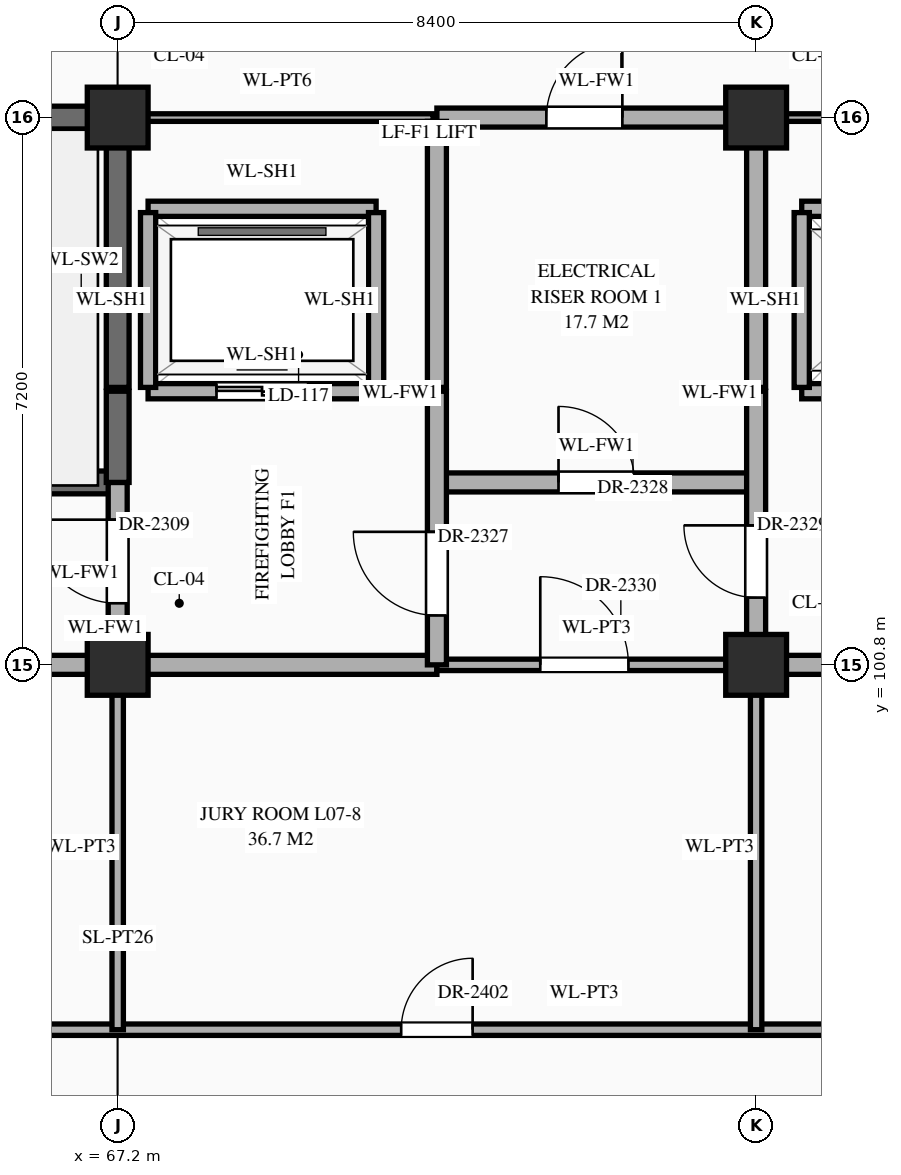
"""IFC4 building model, lengths in metres.
Left out: names, types, materials, properties, quantities, classifications, styles, units other than length and angle.
Written with IfcOpenShell. Run it as: python <this file> out.ifc"""

import sys

from ifc_helpers import new_model, si_unit, direction, frame, frame_2d, origin, origin_2d, place, context, subcontext, project, spatial, rectangle, extrude, element, fill, save


model = new_model("IFC4")
c1 = context("Model", 3, precision=1e-05, world=origin(), true_north=direction((0.0, 1.0)))
c2 = subcontext(c1, "Body", "Model", "MODEL_VIEW")
j1 = project(units=[si_unit("LENGTHUNIT", "METRE"), si_unit("PLANEANGLEUNIT", "RADIAN")], contexts=[c1])
p1 = place(None, origin())
s1 = spatial("IfcSite", under=j1, at=p1, CompositionType="ELEMENT")
p2 = place(p1, origin())
s2 = spatial("IfcBuilding", under=s1, at=p2, CompositionType="ELEMENT")
p3 = place(p2, frame((0.0, 0.0, 30.6)))
s3 = spatial("IfcBuildingStorey", under=s2, at=p3, CompositionType="ELEMENT", Elevation=30.6)
for number, where, z_axis, x_axis in (
    (1, (67.2, 100.8, 0.0), (0.0, 0.0, 1.0), (1.0, 0.0, 0.0)),
    (2, (67.2, 108.0, 0.0), (0.0, 0.0, 1.0), (1.0, 0.0, 0.0)),
    (3, (75.6, 100.8, 0.0), (0.0, 0.0, 1.0), (1.0, 0.0, 0.0)),
    (4, (75.6, 108.0, 0.0), (0.0, 0.0, 1.0), (1.0, 0.0, 0.0)),
):
    element("IfcColumn", number, at=place(p3, frame(where, z_axis=z_axis, x_axis=x_axis)), inside=s3, PredefinedType="COLUMN", context=c2, shape_type="SweptSolid", body=[
        extrude(rectangle(XDim=0.8, YDim=0.8, at=origin_2d()), origin(), (0.0, 0.0, 1.0), 4.5),
    ])
p4 = place(p3, frame((56.2, 96.0, 0.0), z_axis=(0.0, 0.0, 1.0), x_axis=(1.0, 0.0, 0.0)))
e5 = element("IfcWall", 5, at=p4, inside=s3, PredefinedType="STANDARD", context=c2, shape_type="SweptSolid", body=[
    extrude(rectangle(XDim=27.8, YDim=0.15, at=frame_2d((13.9, 0.0))), origin(), (0.0, 0.0, 1.0), 4.24),
])
p5 = place(p4, frame((0.68, 0.0, 0.0)))
e6 = element("IfcOpeningElement", 6, at=p5, cuts=e5, PredefinedType="OPENING", context=c2, shape_type="SweptSolid", body=[
    extrude(rectangle(XDim=1.24, YDim=2.3, at=frame_2d((0.62, 1.15))), frame((0.0, 0.087, 0.0), z_axis=(0.0, -1.0, 0.0), x_axis=(1.0, 0.0, 0.0)), (0.0, 0.0, 1.0), 0.174),
])
p6 = place(p4, frame((6.16, 0.0, 0.0)))
e7 = element("IfcOpeningElement", 7, at=p6, cuts=e5, PredefinedType="OPENING", context=c2, shape_type="SweptSolid", body=[
    extrude(rectangle(XDim=1.28, YDim=2.35, at=frame_2d((0.64, 1.175))), frame((0.0, 0.087, 0.0), z_axis=(0.0, -1.0, 0.0), x_axis=(1.0, 0.0, 0.0)), (0.0, 0.0, 1.0), 0.174),
])
p7 = place(p4, frame((14.73, 0.0, 0.0)))
e8 = element("IfcOpeningElement", 8, at=p7, cuts=e5, PredefinedType="OPENING", context=c2, shape_type="SweptSolid", body=[
    extrude(rectangle(XDim=0.94, YDim=2.3, at=frame_2d((0.47, 1.15))), frame((0.0, 0.087, 0.0), z_axis=(0.0, -1.0, 0.0), x_axis=(1.0, 0.0, 0.0)), (0.0, 0.0, 1.0), 0.174),
])
p8 = place(p4, frame((23.11, 0.0, 0.0)))
e9 = element("IfcOpeningElement", 9, at=p8, cuts=e5, PredefinedType="OPENING", context=c2, shape_type="SweptSolid", body=[
    extrude(rectangle(XDim=0.98, YDim=2.35, at=frame_2d((0.49, 1.175))), frame((0.0, 0.087, 0.0), z_axis=(0.0, -1.0, 0.0), x_axis=(1.0, 0.0, 0.0)), (0.0, 0.0, 1.0), 0.174),
])
p9 = place(p3, frame((58.8, 100.8, 0.0), z_axis=(0.0, 0.0, 1.0), x_axis=(1.0, 0.0, 0.0)))
e10 = element("IfcWall", 10, at=p9, inside=s3, PredefinedType="STANDARD", context=c2, shape_type="SweptSolid", body=[
    extrude(rectangle(XDim=12.6, YDim=0.25, at=frame_2d((6.3, 0.0))), origin(), (0.0, 0.0, 1.0), 3.39),
])
p10 = place(p9, frame((3.725, 0.0, 0.0)))
e11 = element("IfcOpeningElement", 11, at=p10, cuts=e10, PredefinedType="OPENING", context=c2, shape_type="SweptSolid", body=[
    extrude(rectangle(XDim=0.95, YDim=2.15, at=frame_2d((0.475, 1.075))), frame((0.0, 0.137, 0.0), z_axis=(0.0, -1.0, 0.0), x_axis=(1.0, 0.0, 0.0)), (0.0, 0.0, 1.0), 0.274),
])
p11 = place(p3, frame((71.4, 100.8, 0.0), z_axis=(0.0, 0.0, 1.0), x_axis=(1.0, 0.0, 0.0)))
e12 = element("IfcWall", 12, at=p11, inside=s3, PredefinedType="STANDARD", context=c2, shape_type="SweptSolid", body=[
    extrude(rectangle(XDim=4.2, YDim=0.15, at=frame_2d((2.1, 0.0))), origin(), (0.0, 0.0, 1.0), 3.39),
])
p12 = place(p11, frame((1.36, 0.0, 0.0)))
e13 = element("IfcOpeningElement", 13, at=p12, cuts=e12, PredefinedType="OPENING", context=c2, shape_type="SweptSolid", body=[
    extrude(rectangle(XDim=1.16, YDim=2.3, at=frame_2d((0.58, 1.15))), frame((0.0, 0.087, 0.0), z_axis=(0.0, -1.0, 0.0), x_axis=(1.0, 0.0, 0.0)), (0.0, 0.0, 1.0), 0.174),
])
p13 = place(p3, frame((75.6, 100.8, 0.0), z_axis=(0.0, 0.0, 1.0), x_axis=(1.0, 0.0, 0.0)))
e14 = element("IfcWall", 14, at=p13, inside=s3, PredefinedType="STANDARD", context=c2, shape_type="SweptSolid", body=[
    extrude(rectangle(XDim=16.8, YDim=0.25, at=frame_2d((8.4, 0.0))), origin(), (0.0, 0.0, 1.0), 3.39),
])
p14 = place(p13, frame((3.65, 0.0, 0.0)))
e15 = element("IfcOpeningElement", 15, at=p14, cuts=e14, PredefinedType="OPENING", context=c2, shape_type="SweptSolid", body=[
    extrude(rectangle(XDim=1.1, YDim=2.2, at=frame_2d((0.55, 1.1))), frame((0.0, 0.137, 0.0), z_axis=(0.0, -1.0, 0.0), x_axis=(1.0, 0.0, 0.0)), (0.0, 0.0, 1.0), 0.274),
])
p15 = place(p13, frame((9.785, 0.0, 0.0)))
e16 = element("IfcOpeningElement", 16, at=p15, cuts=e14, PredefinedType="OPENING", context=c2, shape_type="SweptSolid", body=[
    extrude(rectangle(XDim=0.95, YDim=2.15, at=frame_2d((0.475, 1.075))), frame((0.0, 0.137, 0.0), z_axis=(0.0, -1.0, 0.0), x_axis=(1.0, 0.0, 0.0)), (0.0, 0.0, 1.0), 0.274),
])
p16 = place(p13, frame((12.45, 0.0, 0.0)))
e17 = element("IfcOpeningElement", 17, at=p16, cuts=e14, PredefinedType="OPENING", context=c2, shape_type="SweptSolid", body=[
    extrude(rectangle(XDim=1.1, YDim=2.2, at=frame_2d((0.55, 1.1))), frame((0.0, 0.137, 0.0), z_axis=(0.0, -1.0, 0.0), x_axis=(1.0, 0.0, 0.0)), (0.0, 0.0, 1.0), 0.274),
])
p17 = place(p13, frame((14.84, 0.0, 0.0)))
e18 = element("IfcOpeningElement", 18, at=p17, cuts=e14, PredefinedType="OPENING", context=c2, shape_type="SweptSolid", body=[
    extrude(rectangle(XDim=1.0, YDim=2.2, at=frame_2d((0.5, 1.1))), frame((0.0, 0.137, 0.0), z_axis=(0.0, -1.0, 0.0), x_axis=(1.0, 0.0, 0.0)), (0.0, 0.0, 1.0), 0.274),
])
p18 = place(p3, frame((58.8, 103.2, 0.0), z_axis=(0.0, 0.0, 1.0), x_axis=(1.0, 0.0, 0.0)))
e19 = element("IfcWall", 19, at=p18, inside=s3, PredefinedType="SHEAR", context=c2, shape_type="SweptSolid", body=[
    extrude(rectangle(XDim=8.4, YDim=0.3, at=frame_2d((4.2, 0.0))), origin(), (0.0, 0.0, 1.0), 4.24),
])
p19 = place(p18, frame((0.65, 0.0, 0.0)))
e20 = element("IfcOpeningElement", 20, at=p19, cuts=e19, PredefinedType="OPENING", context=c2, shape_type="SweptSolid", body=[
    extrude(rectangle(XDim=1.1, YDim=2.2, at=frame_2d((0.55, 1.1))), frame((0.0, 0.162, 0.0), z_axis=(0.0, -1.0, 0.0), x_axis=(1.0, 0.0, 0.0)), (0.0, 0.0, 1.0), 0.324),
])
p20 = place(p3, frame((71.4, 103.2, 0.0), z_axis=(0.0, 0.0, 1.0), x_axis=(1.0, 0.0, 0.0)))
e21 = element("IfcWall", 21, at=p20, inside=s3, PredefinedType="STANDARD", context=c2, shape_type="SweptSolid", body=[
    extrude(rectangle(XDim=4.2, YDim=0.25, at=frame_2d((2.1, 0.0))), origin(), (0.0, 0.0, 1.0), 4.24),
])
p21 = place(p20, frame((1.6, 0.0, 0.0)))
e22 = element("IfcOpeningElement", 22, at=p21, cuts=e21, PredefinedType="OPENING", context=c2, shape_type="SweptSolid", body=[
    extrude(rectangle(XDim=1.0, YDim=2.2, at=frame_2d((0.5, 1.1))), frame((0.0, 0.137, 0.0), z_axis=(0.0, -1.0, 0.0), x_axis=(1.0, 0.0, 0.0)), (0.0, 0.0, 1.0), 0.274),
])
p22 = place(p3, frame((67.6, 104.4, 0.0), z_axis=(0.0, 0.0, 1.0), x_axis=(1.0, 0.0, 0.0)))
e23 = element("IfcWall", 23, at=p22, inside=s3, PredefinedType="STANDARD", context=c2, shape_type="SweptSolid", body=[
    extrude(rectangle(XDim=3.0, YDim=0.2, at=frame_2d((1.5, 0.0))), origin(), (0.0, 0.0, 1.0), 4.24),
])
p23 = place(p22, frame((0.9, 0.0, 0.0)))
e24 = element("IfcOpeningElement", 24, at=p23, cuts=e23, PredefinedType="OPENING", context=c2, shape_type="SweptSolid", body=[
    extrude(rectangle(XDim=1.2, YDim=2.15, at=frame_2d((0.6, 1.075))), frame((0.0, 0.112, 0.0), z_axis=(0.0, -1.0, 0.0), x_axis=(1.0, 0.0, 0.0)), (0.0, 0.0, 1.0), 0.224),
])
p24 = place(p3, frame((76.2, 104.4, 0.0), z_axis=(0.0, 0.0, 1.0), x_axis=(1.0, 0.0, 0.0)))
e25 = element("IfcWall", 25, at=p24, inside=s3, PredefinedType="STANDARD", context=c2, shape_type="SweptSolid", body=[
    extrude(rectangle(XDim=2.4, YDim=0.2, at=frame_2d((1.2, 0.0))), origin(), (0.0, 0.0, 1.0), 4.24),
])
p25 = place(p24, frame((0.7, 0.0, 0.0)))
e26 = element("IfcOpeningElement", 26, at=p25, cuts=e25, PredefinedType="OPENING", context=c2, shape_type="SweptSolid", body=[
    extrude(rectangle(XDim=1.0, YDim=2.15, at=frame_2d((0.5, 1.075))), frame((0.0, 0.112, 0.0), z_axis=(0.0, -1.0, 0.0), x_axis=(1.0, 0.0, 0.0)), (0.0, 0.0, 1.0), 0.224),
])
p26 = place(p3, frame((67.6, 106.8, 0.0), z_axis=(0.0, 0.0, 1.0), x_axis=(1.0, 0.0, 0.0)))
e27 = element("IfcWall", 27, at=p26, inside=s3, PredefinedType="STANDARD", context=c2, shape_type="SweptSolid", body=[
    extrude(rectangle(XDim=3.0, YDim=0.2, at=frame_2d((1.5, 0.0))), origin(), (0.0, 0.0, 1.0), 4.24),
])
p27 = place(p3, frame((76.2, 106.8, 0.0), z_axis=(0.0, 0.0, 1.0), x_axis=(1.0, 0.0, 0.0)))
e28 = element("IfcWall", 28, at=p27, inside=s3, PredefinedType="STANDARD", context=c2, shape_type="SweptSolid", body=[
    extrude(rectangle(XDim=2.4, YDim=0.2, at=frame_2d((1.2, 0.0))), origin(), (0.0, 0.0, 1.0), 4.24),
])
p28 = place(p3, frame((58.8, 108.0, 0.0), z_axis=(0.0, 0.0, 1.0), x_axis=(1.0, 0.0, 0.0)))
e29 = element("IfcWall", 29, at=p28, inside=s3, PredefinedType="SHEAR", context=c2, shape_type="SweptSolid", body=[
    extrude(rectangle(XDim=8.4, YDim=0.3, at=frame_2d((4.2, 0.0))), origin(), (0.0, 0.0, 1.0), 4.24),
])
p29 = place(p3, frame((67.25, 108.0, 0.0), z_axis=(0.0, 0.0, 1.0), x_axis=(1.0, 0.0, 0.0)))
e30 = element("IfcWall", 30, at=p29, inside=s3, PredefinedType="STANDARD", context=c2, shape_type="SweptSolid", body=[
    extrude(rectangle(XDim=4.1, YDim=0.1, at=frame_2d((2.05, 0.0))), origin(), (0.0, 0.0, 1.0), 3.39),
])
p30 = place(p3, frame((71.4, 108.0, 0.0), z_axis=(0.0, 0.0, 1.0), x_axis=(1.0, 0.0, 0.0)))
e31 = element("IfcWall", 31, at=p30, inside=s3, PredefinedType="STANDARD", context=c2, shape_type="SweptSolid", body=[
    extrude(rectangle(XDim=4.2, YDim=0.25, at=frame_2d((2.1, 0.0))), origin(), (0.0, 0.0, 1.0), 3.39),
])
p31 = place(p30, frame((1.44, 0.0, 0.0)))
e32 = element("IfcOpeningElement", 32, at=p31, cuts=e31, PredefinedType="OPENING", context=c2, shape_type="SweptSolid", body=[
    extrude(rectangle(XDim=1.0, YDim=2.2, at=frame_2d((0.5, 1.1))), frame((0.0, 0.137, 0.0), z_axis=(0.0, -1.0, 0.0), x_axis=(1.0, 0.0, 0.0)), (0.0, 0.0, 1.0), 0.274),
])
p32 = place(p3, frame((75.65, 108.0, 0.0), z_axis=(0.0, 0.0, 1.0), x_axis=(1.0, 0.0, 0.0)))
e33 = element("IfcWall", 33, at=p32, inside=s3, PredefinedType="STANDARD", context=c2, shape_type="SweptSolid", body=[
    extrude(rectangle(XDim=6.15, YDim=0.1, at=frame_2d((3.075, 0.0))), origin(), (0.0, 0.0, 1.0), 3.39),
])
p33 = place(p3, frame((67.2, 96.0, 0.0), z_axis=(0.0, 0.0, 1.0), x_axis=(0.0, 1.0, 0.0)))
e34 = element("IfcWall", 34, at=p33, inside=s3, PredefinedType="STANDARD", context=c2, shape_type="SweptSolid", body=[
    extrude(rectangle(XDim=4.8, YDim=0.15, at=frame_2d((2.4, 0.0))), origin(), (0.0, 0.0, 1.0), 3.49),
])
p34 = place(p3, frame((67.2, 100.8, 0.0), z_axis=(0.0, 0.0, 1.0), x_axis=(0.0, 1.0, 0.0)))
e35 = element("IfcWall", 35, at=p34, inside=s3, PredefinedType="STANDARD", context=c2, shape_type="SweptSolid", body=[
    extrude(rectangle(XDim=2.4, YDim=0.25, at=frame_2d((1.2, 0.0))), origin(), (0.0, 0.0, 1.0), 3.49),
])
p35 = place(p34, frame((0.81, 0.0, 0.0)))
e36 = element("IfcOpeningElement", 36, at=p35, cuts=e35, PredefinedType="OPENING", context=c2, shape_type="SweptSolid", body=[
    extrude(rectangle(XDim=1.1, YDim=2.2, at=frame_2d((0.55, 1.1))), frame((0.0, 0.137, 0.0), z_axis=(0.0, -1.0, 0.0), x_axis=(1.0, 0.0, 0.0)), (0.0, 0.0, 1.0), 0.274),
])
p36 = place(p3, frame((67.2, 103.2, 0.0), z_axis=(0.0, 0.0, 1.0), x_axis=(0.0, 1.0, 0.0)))
e37 = element("IfcWall", 37, at=p36, inside=s3, PredefinedType="SHEAR", context=c2, shape_type="SweptSolid", body=[
    extrude(rectangle(XDim=1.2, YDim=0.3, at=frame_2d((0.6, 0.0))), origin(), (0.0, 0.0, 1.0), 4.24),
])
p37 = place(p3, frame((67.2, 104.45, 0.0), z_axis=(0.0, 0.0, 1.0), x_axis=(0.0, 1.0, 0.0)))
e38 = element("IfcWall", 38, at=p37, inside=s3, PredefinedType="SHEAR", context=c2, shape_type="SweptSolid", body=[
    extrude(rectangle(XDim=3.5, YDim=0.3, at=frame_2d((1.75, 0.0))), origin(), (0.0, 0.0, 1.0), 4.24),
])
for number, where, z_axis, x_axis in (
    (39, (67.6, 104.45, 0.0), (0.0, 0.0, 1.0), (0.0, 1.0, 0.0)),
    (40, (70.6, 104.45, 0.0), (0.0, 0.0, 1.0), (0.0, 1.0, 0.0)),
):
    element("IfcWall", number, at=place(p3, frame(where, z_axis=z_axis, x_axis=x_axis)), inside=s3, PredefinedType="STANDARD", context=c2, shape_type="SweptSolid", body=[
        extrude(rectangle(XDim=2.3, YDim=0.2, at=frame_2d((1.15, 0.0))), origin(), (0.0, 0.0, 1.0), 4.24),
    ])
p38 = place(p3, frame((71.4, 100.8, 0.0), z_axis=(0.0, 0.0, 1.0), x_axis=(0.0, 1.0, 0.0)))
e41 = element("IfcWall", 41, at=p38, inside=s3, PredefinedType="STANDARD", context=c2, shape_type="SweptSolid", body=[
    extrude(rectangle(XDim=3.6, YDim=0.25, at=frame_2d((1.8, 0.0))), origin(), (0.0, 0.0, 1.0), 3.89),
])
p39 = place(p38, frame((0.65, 0.0, 0.0)))
e42 = element("IfcOpeningElement", 42, at=p39, cuts=e41, PredefinedType="OPENING", context=c2, shape_type="SweptSolid", body=[
    extrude(rectangle(XDim=1.1, YDim=2.2, at=frame_2d((0.55, 1.1))), frame((0.0, 0.137, 0.0), z_axis=(0.0, -1.0, 0.0), x_axis=(1.0, 0.0, 0.0)), (0.0, 0.0, 1.0), 0.274),
])
p40 = place(p3, frame((71.4, 104.45, 0.0), z_axis=(0.0, 0.0, 1.0), x_axis=(0.0, 1.0, 0.0)))
e43 = element("IfcWall", 43, at=p40, inside=s3, PredefinedType="STANDARD", context=c2, shape_type="SweptSolid", body=[
    extrude(rectangle(XDim=3.5, YDim=0.25, at=frame_2d((1.75, 0.0))), origin(), (0.0, 0.0, 1.0), 3.89),
])
p41 = place(p3, frame((75.6, 96.0, 0.0), z_axis=(0.0, 0.0, 1.0), x_axis=(0.0, 1.0, 0.0)))
e44 = element("IfcWall", 44, at=p41, inside=s3, PredefinedType="STANDARD", context=c2, shape_type="SweptSolid", body=[
    extrude(rectangle(XDim=4.8, YDim=0.15, at=frame_2d((2.4, 0.0))), origin(), (0.0, 0.0, 1.0), 3.49),
])
p42 = place(p3, frame((75.6, 100.8, 0.0), z_axis=(0.0, 0.0, 1.0), x_axis=(0.0, 1.0, 0.0)))
e45 = element("IfcWall", 45, at=p42, inside=s3, PredefinedType="STANDARD", context=c2, shape_type="SweptSolid", body=[
    extrude(rectangle(XDim=3.6, YDim=0.25, at=frame_2d((1.8, 0.0))), origin(), (0.0, 0.0, 1.0), 3.49),
])
p43 = place(p42, frame((0.885, 0.0, 0.0)))
e46 = element("IfcOpeningElement", 46, at=p43, cuts=e45, PredefinedType="OPENING", context=c2, shape_type="SweptSolid", body=[
    extrude(rectangle(XDim=0.95, YDim=2.15, at=frame_2d((0.475, 1.075))), frame((0.0, 0.137, 0.0), z_axis=(0.0, -1.0, 0.0), x_axis=(1.0, 0.0, 0.0)), (0.0, 0.0, 1.0), 0.274),
])
p44 = place(p3, frame((75.6, 104.45, 0.0), z_axis=(0.0, 0.0, 1.0), x_axis=(0.0, 1.0, 0.0)))
e47 = element("IfcWall", 47, at=p44, inside=s3, PredefinedType="STANDARD", context=c2, shape_type="SweptSolid", body=[
    extrude(rectangle(XDim=3.5, YDim=0.25, at=frame_2d((1.75, 0.0))), origin(), (0.0, 0.0, 1.0), 3.49),
])
p45 = place(p3, frame((76.2, 104.45, 0.0), z_axis=(0.0, 0.0, 1.0), x_axis=(0.0, 1.0, 0.0)))
e48 = element("IfcWall", 48, at=p45, inside=s3, PredefinedType="STANDARD", context=c2, shape_type="SweptSolid", body=[
    extrude(rectangle(XDim=2.3, YDim=0.2, at=frame_2d((1.15, 0.0))), origin(), (0.0, 0.0, 1.0), 4.24),
])
p46 = place(p23, origin())
e49 = element("IfcDoor", 49, at=p46, inside=s3, OperationType="DOUBLE_DOOR_SLIDING", PredefinedType="DOOR", context=c2, shape_type="SweptSolid", body=[
    extrude(rectangle(XDim=1.2, YDim=2.15, at=frame_2d((0.6, 1.075))), frame((0.0, 0.025, 0.0), z_axis=(0.0, -1.0, 0.0), x_axis=(1.0, 0.0, 0.0)), (0.0, 0.0, 1.0), 0.05),
])
fill(e24, e49)
p47 = place(p35, origin())
e50 = element("IfcDoor", 50, at=p47, inside=s3, OperationType="SINGLE_SWING_RIGHT", PredefinedType="DOOR", context=c2, shape_type="SweptSolid", body=[
    extrude(rectangle(XDim=1.1, YDim=2.2, at=frame_2d((0.55, 1.1))), frame((0.0, 0.025, 0.0), z_axis=(0.0, -1.0, 0.0), x_axis=(1.0, 0.0, 0.0)), (0.0, 0.0, 1.0), 0.05),
])
fill(e36, e50)
p48 = place(p39, origin())
e51 = element("IfcDoor", 51, at=p48, inside=s3, OperationType="SINGLE_SWING_RIGHT", PredefinedType="DOOR", context=c2, shape_type="SweptSolid", body=[
    extrude(rectangle(XDim=1.1, YDim=2.2, at=frame_2d((0.55, 1.1))), frame((0.0, 0.025, 0.0), z_axis=(0.0, -1.0, 0.0), x_axis=(1.0, 0.0, 0.0)), (0.0, 0.0, 1.0), 0.05),
])
fill(e42, e51)
p49 = place(p21, origin())
e52 = element("IfcDoor", 52, at=p49, inside=s3, OperationType="SINGLE_SWING_LEFT", PredefinedType="DOOR", context=c2, shape_type="SweptSolid", body=[
    extrude(rectangle(XDim=1.0, YDim=2.2, at=frame_2d((0.5, 1.1))), frame((0.0, 0.025, 0.0), z_axis=(0.0, -1.0, 0.0), x_axis=(1.0, 0.0, 0.0)), (0.0, 0.0, 1.0), 0.05),
])
fill(e22, e52)
p50 = place(p43, origin())
e53 = element("IfcDoor", 53, at=p50, inside=s3, OperationType="SINGLE_SWING_RIGHT", PredefinedType="DOOR", context=c2, shape_type="SweptSolid", body=[
    extrude(rectangle(XDim=0.95, YDim=2.15, at=frame_2d((0.475, 1.075))), frame((0.0, 0.025, 0.0), z_axis=(0.0, -1.0, 0.0), x_axis=(1.0, 0.0, 0.0)), (0.0, 0.0, 1.0), 0.05),
])
fill(e46, e53)
p51 = place(p12, origin())
e54 = element("IfcDoor", 54, at=p51, inside=s3, OperationType="SINGLE_SWING_LEFT", PredefinedType="DOOR", context=c2, shape_type="SweptSolid", body=[
    extrude(rectangle(XDim=1.16, YDim=2.3, at=frame_2d((0.58, 1.15))), frame((0.0, 0.025, 0.0), z_axis=(0.0, -1.0, 0.0), x_axis=(1.0, 0.0, 0.0)), (0.0, 0.0, 1.0), 0.05),
])
fill(e13, e54)
p52 = place(p31, origin())
e55 = element("IfcDoor", 55, at=p52, inside=s3, OperationType="SINGLE_SWING_RIGHT", PredefinedType="DOOR", context=c2, shape_type="SweptSolid", body=[
    extrude(rectangle(XDim=1.0, YDim=2.2, at=frame_2d((0.5, 1.1))), frame((0.0, 0.025, 0.0), z_axis=(0.0, -1.0, 0.0), x_axis=(1.0, 0.0, 0.0)), (0.0, 0.0, 1.0), 0.05),
])
fill(e32, e55)
p53 = place(p7, origin())
e56 = element("IfcDoor", 56, at=p53, inside=s3, OperationType="SINGLE_SWING_RIGHT", PredefinedType="DOOR", context=c2, shape_type="SweptSolid", body=[
    extrude(rectangle(XDim=0.94, YDim=2.3, at=frame_2d((0.47, 1.15))), frame((0.0, 0.025, 0.0), z_axis=(0.0, -1.0, 0.0), x_axis=(1.0, 0.0, 0.0)), (0.0, 0.0, 1.0), 0.05),
])
fill(e8, e56)
save(model, sys.argv[1])
